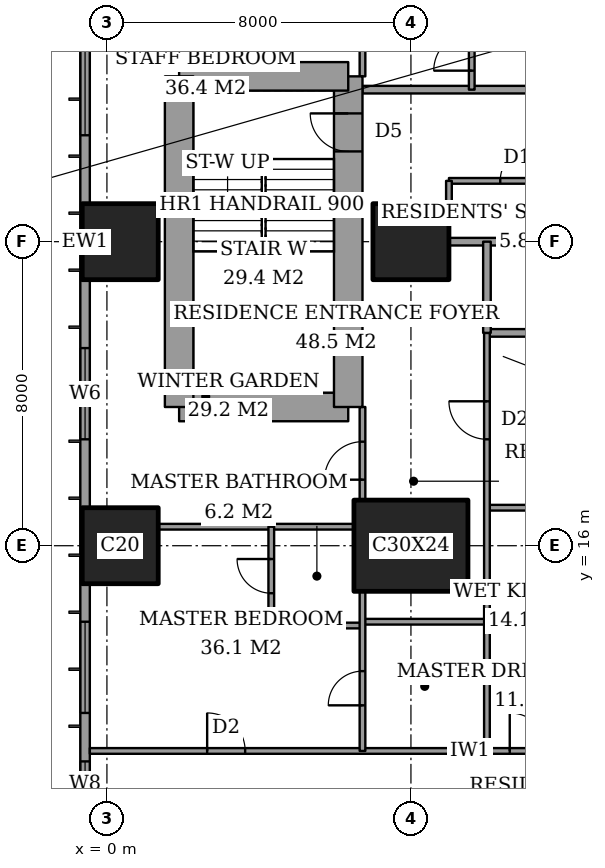
"""IFC4 building model, lengths in metres.
Left out: names, types, materials, properties, quantities, classifications, styles, units other than length and angle.
Written with IfcOpenShell. Run it as: python <this file> out.ifc"""

import sys

from ifc_helpers import new_model, si_unit, direction, frame, frame_2d, origin, origin_2d, place, context, subcontext, project, spatial, rectangle, extrude, element, fill, save


model = new_model("IFC4")
c1 = context("Model", 3, precision=1e-05, world=origin(), true_north=direction((0.0, 1.0)))
c2 = subcontext(c1, "Body", "Model", "MODEL_VIEW")
j1 = project(units=[si_unit("LENGTHUNIT", "METRE"), si_unit("PLANEANGLEUNIT", "RADIAN")], contexts=[c1])
p1 = place(None, origin())
s1 = spatial("IfcSite", under=j1, at=p1, CompositionType="ELEMENT")
p2 = place(p1, origin())
s2 = spatial("IfcBuilding", under=s1, at=p2, CompositionType="ELEMENT")
p3 = place(p2, frame((0.0, 0.0, 51.2)))
s3 = spatial("IfcBuildingStorey", under=s2, at=p3, CompositionType="ELEMENT", Elevation=51.2)
for number, where, z_axis, x_axis in (
    (1, (0.35, 16.0, 0.0), (0.0, 0.0, 1.0), (1.0, 0.0, 0.0)),
    (2, (0.35, 24.0, 0.0), (0.0, 0.0, 1.0), (1.0, 0.0, 0.0)),
):
    element("IfcColumn", number, at=place(p3, frame(where, z_axis=z_axis, x_axis=x_axis)), inside=s3, PredefinedType="COLUMN", context=c2, shape_type="SweptSolid", body=[
        extrude(rectangle(XDim=2.0, YDim=2.0, at=origin_2d()), origin(), (0.0, 0.0, 1.0), 3.6),
    ])
p4 = place(p3, frame((8.0, 16.0, 0.0), z_axis=(0.0, 0.0, 1.0), x_axis=(1.0, 0.0, 0.0)))
e3 = element("IfcColumn", 3, at=p4, inside=s3, PredefinedType="COLUMN", context=c2, shape_type="SweptSolid", body=[
    extrude(rectangle(XDim=3.0, YDim=2.4, at=origin_2d()), origin(), (0.0, 0.0, 1.0), 3.6),
])
p5 = place(p3, frame((8.0, 24.0, 0.0), z_axis=(0.0, 0.0, 1.0), x_axis=(1.0, 0.0, 0.0)))
e4 = element("IfcColumn", 4, at=p5, inside=s3, PredefinedType="COLUMN", context=c2, shape_type="SweptSolid", body=[
    extrude(rectangle(XDim=2.0, YDim=2.0, at=origin_2d()), origin(), (0.0, 0.0, 1.0), 3.6),
])
p6 = place(p3, frame((1.9, 19.65, 0.0), z_axis=(0.0, 0.0, 1.0), x_axis=(1.0, 0.0, 0.0)))
e5 = element("IfcWall", 5, at=p6, inside=s3, PredefinedType="SHEAR", context=c2, shape_type="SweptSolid", body=[
    extrude(rectangle(XDim=4.45, YDim=0.75, at=frame_2d((2.225, 0.0))), origin(), (0.0, 0.0, 1.0), 3.6),
])
p7 = place(p3, frame((6.35, 19.65, 0.0), z_axis=(0.0, 0.0, 1.0), x_axis=(0.0, 1.0, 0.0)))
e6 = element("IfcWall", 6, at=p7, inside=s3, PredefinedType="SHEAR", context=c2, shape_type="SweptSolid", body=[
    extrude(rectangle(XDim=8.7, YDim=0.75, at=frame_2d((4.35, 0.0))), origin(), (0.0, 0.0, 1.0), 3.6),
])
p8 = place(p7, frame((6.725, 0.0, 0.0)))
e7 = element("IfcOpeningElement", 7, at=p8, cuts=e6, PredefinedType="OPENING", context=c2, shape_type="SweptSolid", body=[
    extrude(rectangle(XDim=1.0, YDim=2.1, at=frame_2d((0.5, 1.05))), frame((0.0, 0.385, 0.0), z_axis=(0.0, -1.0, 0.0), x_axis=(1.0, 0.0, 0.0)), (0.0, 0.0, 1.0), 0.77),
])
p9 = place(p3, frame((6.35, 28.35, 0.0), z_axis=(0.0, 0.0, 1.0), x_axis=(-1.0, 0.0, 0.0)))
e8 = element("IfcWall", 8, at=p9, inside=s3, PredefinedType="SHEAR", context=c2, shape_type="SweptSolid", body=[
    extrude(rectangle(XDim=4.45, YDim=0.75, at=frame_2d((2.225, 0.0))), origin(), (0.0, 0.0, 1.0), 3.6),
])
p10 = place(p3, frame((1.9, 28.35, 0.0), z_axis=(0.0, 0.0, 1.0), x_axis=(0.0, -1.0, 0.0)))
e9 = element("IfcWall", 9, at=p10, inside=s3, PredefinedType="SHEAR", context=c2, shape_type="SweptSolid", body=[
    extrude(rectangle(XDim=8.7, YDim=0.75, at=frame_2d((4.35, 0.0))), origin(), (0.0, 0.0, 1.0), 3.6),
])
p11 = place(p3, frame((-0.575, 44.825, 0.0), z_axis=(0.0, 0.0, 1.0), x_axis=(0.0, -1.0, 0.0)))
e10 = element("IfcWall", 10, at=p11, inside=s3, PredefinedType="SOLIDWALL", context=c2, shape_type="SweptSolid", body=[
    extrude(rectangle(XDim=41.65, YDim=0.25, at=frame_2d((20.825, 0.0))), origin(), (0.0, 0.0, 1.0), 3.6),
])
p12 = place(p11, frame((0.775, 0.0, 0.6)))
e11 = element("IfcOpeningElement", 11, at=p12, cuts=e10, PredefinedType="OPENING", context=c2, shape_type="SweptSolid", body=[
    extrude(rectangle(XDim=2.4, YDim=2.0, at=frame_2d((1.2, 1.0))), frame((0.0, 0.135, 0.0), z_axis=(0.0, -1.0, 0.0), x_axis=(1.0, 0.0, 0.0)), (0.0, 0.0, 1.0), 0.27),
])
p13 = place(p11, frame((6.1, 0.0, 0.6)))
e12 = element("IfcOpeningElement", 12, at=p13, cuts=e10, PredefinedType="OPENING", context=c2, shape_type="SweptSolid", body=[
    extrude(rectangle(XDim=1.2, YDim=2.0, at=frame_2d((0.6, 1.0))), frame((0.0, 0.135, 0.0), z_axis=(0.0, -1.0, 0.0), x_axis=(1.0, 0.0, 0.0)), (0.0, 0.0, 1.0), 0.27),
])
p14 = place(p11, frame((8.425, 0.0, 0.6)))
e13 = element("IfcOpeningElement", 13, at=p14, cuts=e10, PredefinedType="OPENING", context=c2, shape_type="SweptSolid", body=[
    extrude(rectangle(XDim=2.4, YDim=2.0, at=frame_2d((1.2, 1.0))), frame((0.0, 0.135, 0.0), z_axis=(0.0, -1.0, 0.0), x_axis=(1.0, 0.0, 0.0)), (0.0, 0.0, 1.0), 0.27),
])
p15 = place(p11, frame((15.625, 0.0, 0.6)))
e14 = element("IfcOpeningElement", 14, at=p15, cuts=e10, PredefinedType="OPENING", context=c2, shape_type="SweptSolid", body=[
    extrude(rectangle(XDim=2.4, YDim=2.0, at=frame_2d((1.2, 1.0))), frame((0.0, 0.135, 0.0), z_axis=(0.0, -1.0, 0.0), x_axis=(1.0, 0.0, 0.0)), (0.0, 0.0, 1.0), 0.27),
])
p16 = place(p11, frame((23.625, 0.0, 0.6)))
e15 = element("IfcOpeningElement", 15, at=p16, cuts=e10, PredefinedType="OPENING", context=c2, shape_type="SweptSolid", body=[
    extrude(rectangle(XDim=2.4, YDim=2.0, at=frame_2d((1.2, 1.0))), frame((0.0, 0.135, 0.0), z_axis=(0.0, -1.0, 0.0), x_axis=(1.0, 0.0, 0.0)), (0.0, 0.0, 1.0), 0.27),
])
p17 = place(p11, frame((30.825, 0.0, 0.6)))
e16 = element("IfcOpeningElement", 16, at=p17, cuts=e10, PredefinedType="OPENING", context=c2, shape_type="SweptSolid", body=[
    extrude(rectangle(XDim=2.4, YDim=2.0, at=frame_2d((1.2, 1.0))), frame((0.0, 0.135, 0.0), z_axis=(0.0, -1.0, 0.0), x_axis=(1.0, 0.0, 0.0)), (0.0, 0.0, 1.0), 0.27),
])
p18 = place(p11, frame((34.5, 0.0, 0.6)))
e17 = element("IfcOpeningElement", 17, at=p18, cuts=e10, PredefinedType="OPENING", context=c2, shape_type="SweptSolid", body=[
    extrude(rectangle(XDim=1.2, YDim=2.0, at=frame_2d((0.6, 1.0))), frame((0.0, 0.135, 0.0), z_axis=(0.0, -1.0, 0.0), x_axis=(1.0, 0.0, 0.0)), (0.0, 0.0, 1.0), 0.27),
])
p19 = place(p11, frame((38.475, 0.0, 0.6)))
e18 = element("IfcOpeningElement", 18, at=p19, cuts=e10, PredefinedType="OPENING", context=c2, shape_type="SweptSolid", body=[
    extrude(rectangle(XDim=2.4, YDim=2.0, at=frame_2d((1.2, 1.0))), frame((0.0, 0.135, 0.0), z_axis=(0.0, -1.0, 0.0), x_axis=(1.0, 0.0, 0.0)), (0.0, 0.0, 1.0), 0.27),
])
p20 = place(p3, frame((-0.45, 10.6, 0.0), z_axis=(0.0, 0.0, 1.0), x_axis=(1.0, 0.0, 0.0)))
e19 = element("IfcWall", 19, at=p20, inside=s3, PredefinedType="PARTITIONING", context=c2, shape_type="SweptSolid", body=[
    extrude(rectangle(XDim=25.011, YDim=0.15, at=frame_2d((12.505, 0.0))), origin(), (0.0, 0.0, 1.0), 3.35),
])
p21 = place(p20, frame((13.25, 0.0, 0.0)))
e20 = element("IfcOpeningElement", 20, at=p21, cuts=e19, PredefinedType="OPENING", context=c2, shape_type="SweptSolid", body=[
    extrude(rectangle(XDim=1.0, YDim=2.1, at=frame_2d((0.5, 1.05))), frame((0.0, 0.085, 0.0), z_axis=(0.0, -1.0, 0.0), x_axis=(1.0, 0.0, 0.0)), (0.0, 0.0, 1.0), 0.17),
])
p22 = place(p20, frame((3.087, 0.0, 0.0)))
e21 = element("IfcOpeningElement", 21, at=p22, cuts=e19, PredefinedType="OPENING", context=c2, shape_type="SweptSolid", body=[
    extrude(rectangle(XDim=1.0, YDim=2.1, at=frame_2d((0.5, 1.05))), frame((0.0, 0.085, 0.0), z_axis=(0.0, -1.0, 0.0), x_axis=(1.0, 0.0, 0.0)), (0.0, 0.0, 1.0), 0.17),
])
p23 = place(p20, frame((11.05, 0.0, 0.0)))
e22 = element("IfcOpeningElement", 22, at=p23, cuts=e19, PredefinedType="OPENING", context=c2, shape_type="SweptSolid", body=[
    extrude(rectangle(XDim=1.0, YDim=2.1, at=frame_2d((0.5, 1.05))), frame((0.0, 0.085, 0.0), z_axis=(0.0, -1.0, 0.0), x_axis=(1.0, 0.0, 0.0)), (0.0, 0.0, 1.0), 0.17),
])
p24 = place(p20, frame((16.15, 0.0, 0.0)))
e23 = element("IfcOpeningElement", 23, at=p24, cuts=e19, PredefinedType="OPENING", context=c2, shape_type="SweptSolid", body=[
    extrude(rectangle(XDim=1.0, YDim=2.1, at=frame_2d((0.5, 1.05))), frame((0.0, 0.085, 0.0), z_axis=(0.0, -1.0, 0.0), x_axis=(1.0, 0.0, 0.0)), (0.0, 0.0, 1.0), 0.17),
])
p25 = place(p20, frame((21.175, 0.0, 0.0)))
e24 = element("IfcOpeningElement", 24, at=p25, cuts=e19, PredefinedType="OPENING", context=c2, shape_type="SweptSolid", body=[
    extrude(rectangle(XDim=1.0, YDim=2.1, at=frame_2d((0.5, 1.05))), frame((0.0, 0.085, 0.0), z_axis=(0.0, -1.0, 0.0), x_axis=(1.0, 0.0, 0.0)), (0.0, 0.0, 1.0), 0.17),
])
p26 = place(p3, frame((4.325, 13.9, 0.0), z_axis=(0.0, 0.0, 1.0), x_axis=(1.0, 0.0, 0.0)))
e25 = element("IfcWall", 25, at=p26, inside=s3, PredefinedType="PARTITIONING", context=c2, shape_type="SweptSolid", body=[
    extrude(rectangle(XDim=2.4, YDim=0.15, at=frame_2d((1.2, 0.0))), origin(), (0.0, 0.0, 1.0), 3.35),
])
p27 = place(p3, frame((6.725, 14.0, 0.0), z_axis=(0.0, 0.0, 1.0), x_axis=(1.0, 0.0, 0.0)))
e26 = element("IfcWall", 26, at=p27, inside=s3, PredefinedType="PARTITIONING", context=c2, shape_type="SweptSolid", body=[
    extrude(rectangle(XDim=3.275, YDim=0.15, at=frame_2d((1.637, 0.0))), origin(), (0.0, 0.0, 1.0), 3.35),
])
p28 = place(p3, frame((1.35, 16.5, 0.0), z_axis=(0.0, 0.0, 1.0), x_axis=(1.0, 0.0, 0.0)))
e27 = element("IfcWall", 27, at=p28, inside=s3, PredefinedType="PARTITIONING", context=c2, shape_type="SweptSolid", body=[
    extrude(rectangle(XDim=5.15, YDim=0.15, at=frame_2d((2.575, 0.0))), origin(), (0.0, 0.0, 1.0), 3.35),
])
p29 = place(p3, frame((10.0, 17.0, 0.0), z_axis=(0.0, 0.0, 1.0), x_axis=(1.0, 0.0, 0.0)))
e28 = element("IfcWall", 28, at=p29, inside=s3, PredefinedType="PARTITIONING", context=c2, shape_type="SweptSolid", body=[
    extrude(rectangle(XDim=4.4, YDim=0.15, at=frame_2d((2.2, 0.0))), origin(), (0.0, 0.0, 1.0), 3.35),
])
p30 = place(p29, frame((2.8, 0.0, 0.0)))
e29 = element("IfcOpeningElement", 29, at=p30, cuts=e28, PredefinedType="OPENING", context=c2, shape_type="SweptSolid", body=[
    extrude(rectangle(XDim=1.0, YDim=2.1, at=frame_2d((0.5, 1.05))), frame((0.0, 0.085, 0.0), z_axis=(0.0, -1.0, 0.0), x_axis=(1.0, 0.0, 0.0)), (0.0, 0.0, 1.0), 0.17),
])
p31 = place(p3, frame((10.0, 21.6, 0.0), z_axis=(0.0, 0.0, 1.0), x_axis=(1.0, 0.0, 0.0)))
e30 = element("IfcWall", 30, at=p31, inside=s3, PredefinedType="PARTITIONING", context=c2, shape_type="SweptSolid", body=[
    extrude(rectangle(XDim=4.8, YDim=0.2, at=frame_2d((2.4, 0.0))), origin(), (0.0, 0.0, 1.0), 3.35),
])
p32 = place(p31, frame((1.95, 0.0, 0.0)))
e31 = element("IfcOpeningElement", 31, at=p32, cuts=e30, PredefinedType="OPENING", context=c2, shape_type="SweptSolid", body=[
    extrude(rectangle(XDim=0.9, YDim=2.1, at=frame_2d((0.45, 1.05))), frame((0.0, 0.11, 0.0), z_axis=(0.0, -1.0, 0.0), x_axis=(1.0, 0.0, 0.0)), (0.0, 0.0, 1.0), 0.22),
])
p33 = place(p3, frame((9.0, 24.0, 0.0), z_axis=(0.0, 0.0, 1.0), x_axis=(1.0, 0.0, 0.0)))
e32 = element("IfcWall", 32, at=p33, inside=s3, PredefinedType="PARTITIONING", context=c2, shape_type="SweptSolid", body=[
    extrude(rectangle(XDim=6.0, YDim=0.2, at=frame_2d((3.0, 0.0))), origin(), (0.0, 0.0, 1.0), 3.35),
])
p34 = place(p3, frame((9.0, 25.6, 0.0), z_axis=(0.0, 0.0, 1.0), x_axis=(1.0, 0.0, 0.0)))
e33 = element("IfcWall", 33, at=p34, inside=s3, PredefinedType="PARTITIONING", context=c2, shape_type="SweptSolid", body=[
    extrude(rectangle(XDim=3.6, YDim=0.15, at=frame_2d((1.8, 0.0))), origin(), (0.0, 0.0, 1.0), 3.35),
])
p35 = place(p34, frame((1.35, 0.0, 0.0)))
e34 = element("IfcOpeningElement", 34, at=p35, cuts=e33, PredefinedType="OPENING", context=c2, shape_type="SweptSolid", body=[
    extrude(rectangle(XDim=0.9, YDim=2.1, at=frame_2d((0.45, 1.05))), frame((0.0, 0.085, 0.0), z_axis=(0.0, -1.0, 0.0), x_axis=(1.0, 0.0, 0.0)), (0.0, 0.0, 1.0), 0.17),
])
p36 = place(p3, frame((6.725, 28.0, 0.0), z_axis=(0.0, 0.0, 1.0), x_axis=(1.0, 0.0, 0.0)))
e35 = element("IfcWall", 35, at=p36, inside=s3, PredefinedType="PARTITIONING", context=c2, shape_type="SweptSolid", body=[
    extrude(rectangle(XDim=17.275, YDim=0.2, at=frame_2d((8.637, 0.0))), origin(), (0.0, 0.0, 1.0), 3.35),
])
p37 = place(p36, frame((6.475, 0.0, 0.0)))
e36 = element("IfcOpeningElement", 36, at=p37, cuts=e35, PredefinedType="OPENING", context=c2, shape_type="SweptSolid", body=[
    extrude(rectangle(XDim=1.2, YDim=2.4, at=frame_2d((0.6, 1.2))), frame((0.0, 0.11, 0.0), z_axis=(0.0, -1.0, 0.0), x_axis=(1.0, 0.0, 0.0)), (0.0, 0.0, 1.0), 0.22),
])
p38 = place(p3, frame((4.325, 13.9, 0.0), z_axis=(0.0, 0.0, 1.0), x_axis=(0.0, 1.0, 0.0)))
e37 = element("IfcWall", 37, at=p38, inside=s3, PredefinedType="PARTITIONING", context=c2, shape_type="SweptSolid", body=[
    extrude(rectangle(XDim=2.6, YDim=0.15, at=frame_2d((1.3, 0.0))), origin(), (0.0, 0.0, 1.0), 3.35),
])
p39 = place(p38, frame((0.85, 0.0, 0.0)))
e38 = element("IfcOpeningElement", 38, at=p39, cuts=e37, PredefinedType="OPENING", context=c2, shape_type="SweptSolid", body=[
    extrude(rectangle(XDim=0.9, YDim=2.1, at=frame_2d((0.45, 1.05))), frame((0.0, 0.085, 0.0), z_axis=(0.0, -1.0, 0.0), x_axis=(1.0, 0.0, 0.0)), (0.0, 0.0, 1.0), 0.17),
])
p40 = place(p3, frame((6.725, 10.6, 0.0), z_axis=(0.0, 0.0, 1.0), x_axis=(0.0, 1.0, 0.0)))
e39 = element("IfcWall", 39, at=p40, inside=s3, PredefinedType="PARTITIONING", context=c2, shape_type="SweptSolid", body=[
    extrude(rectangle(XDim=4.2, YDim=0.15, at=frame_2d((2.1, 0.0))), origin(), (0.0, 0.0, 1.0), 3.35),
])
p41 = place(p40, frame((1.2, 0.0, 0.0)))
e40 = element("IfcOpeningElement", 40, at=p41, cuts=e39, PredefinedType="OPENING", context=c2, shape_type="SweptSolid", body=[
    extrude(rectangle(XDim=0.9, YDim=2.1, at=frame_2d((0.45, 1.05))), frame((0.0, 0.085, 0.0), z_axis=(0.0, -1.0, 0.0), x_axis=(1.0, 0.0, 0.0)), (0.0, 0.0, 1.0), 0.17),
])
p42 = place(p3, frame((6.725, 17.2, 0.0), z_axis=(0.0, 0.0, 1.0), x_axis=(0.0, 1.0, 0.0)))
e41 = element("IfcWall", 41, at=p42, inside=s3, PredefinedType="PARTITIONING", context=c2, shape_type="SweptSolid", body=[
    extrude(rectangle(XDim=2.45, YDim=0.15, at=frame_2d((1.225, 0.0))), origin(), (0.0, 0.0, 1.0), 3.35),
])
p43 = place(p42, frame((0.538, 0.0, 0.0)))
e42 = element("IfcOpeningElement", 42, at=p43, cuts=e41, PredefinedType="OPENING", context=c2, shape_type="SweptSolid", body=[
    extrude(rectangle(XDim=1.0, YDim=2.1, at=frame_2d((0.5, 1.05))), frame((0.0, 0.085, 0.0), z_axis=(0.0, -1.0, 0.0), x_axis=(1.0, 0.0, 0.0)), (0.0, 0.0, 1.0), 0.17),
])
p44 = place(p3, frame((6.725, 28.35, 0.0), z_axis=(0.0, 0.0, 1.0), x_axis=(0.0, 1.0, 0.0)))
e43 = element("IfcWall", 43, at=p44, inside=s3, PredefinedType="PARTITIONING", context=c2, shape_type="SweptSolid", body=[
    extrude(rectangle(XDim=2.45, YDim=0.15, at=frame_2d((1.225, 0.0))), origin(), (0.0, 0.0, 1.0), 3.35),
])
p45 = place(p44, frame((0.913, 0.0, 0.0)))
e44 = element("IfcOpeningElement", 44, at=p45, cuts=e43, PredefinedType="OPENING", context=c2, shape_type="SweptSolid", body=[
    extrude(rectangle(XDim=1.0, YDim=2.1, at=frame_2d((0.5, 1.05))), frame((0.0, 0.085, 0.0), z_axis=(0.0, -1.0, 0.0), x_axis=(1.0, 0.0, 0.0)), (0.0, 0.0, 1.0), 0.17),
])
p46 = place(p3, frame((9.0, 25.0, 0.0), z_axis=(0.0, 0.0, 1.0), x_axis=(0.0, 1.0, 0.0)))
e45 = element("IfcWall", 45, at=p46, inside=s3, PredefinedType="PARTITIONING", context=c2, shape_type="SweptSolid", body=[
    extrude(rectangle(XDim=0.6, YDim=0.15, at=frame_2d((0.3, 0.0))), origin(), (0.0, 0.0, 1.0), 3.35),
])
p47 = place(p3, frame((9.6, 28.0, 0.0), z_axis=(0.0, 0.0, 1.0), x_axis=(0.0, 1.0, 0.0)))
e46 = element("IfcWall", 46, at=p47, inside=s3, PredefinedType="PARTITIONING", context=c2, shape_type="SweptSolid", body=[
    extrude(rectangle(XDim=9.4, YDim=0.15, at=frame_2d((4.7, 0.0))), origin(), (0.0, 0.0, 1.0), 3.35),
])
p48 = place(p47, frame((0.5, 0.0, 0.0)))
e47 = element("IfcOpeningElement", 47, at=p48, cuts=e46, PredefinedType="OPENING", context=c2, shape_type="SweptSolid", body=[
    extrude(rectangle(XDim=1.0, YDim=2.1, at=frame_2d((0.5, 1.05))), frame((0.0, 0.085, 0.0), z_axis=(0.0, -1.0, 0.0), x_axis=(1.0, 0.0, 0.0)), (0.0, 0.0, 1.0), 0.17),
])
p49 = place(p3, frame((10.0, 21.6, 0.0), z_axis=(0.0, 0.0, 1.0), x_axis=(0.0, 1.0, 0.0)))
e48 = element("IfcWall", 48, at=p49, inside=s3, PredefinedType="PARTITIONING", context=c2, shape_type="SweptSolid", body=[
    extrude(rectangle(XDim=2.4, YDim=0.2, at=frame_2d((1.2, 0.0))), origin(), (0.0, 0.0, 1.0), 3.35),
])
p50 = place(p3, frame((10.0, 10.6, 0.0), z_axis=(0.0, 0.0, 1.0), x_axis=(0.0, 1.0, 0.0)))
e49 = element("IfcWall", 49, at=p50, inside=s3, PredefinedType="PARTITIONING", context=c2, shape_type="SweptSolid", body=[
    extrude(rectangle(XDim=11.0, YDim=0.15, at=frame_2d((5.5, 0.0))), origin(), (0.0, 0.0, 1.0), 3.35),
])
p51 = place(p50, frame((8.2, 0.0, 0.0)))
e50 = element("IfcOpeningElement", 50, at=p51, cuts=e49, PredefinedType="OPENING", context=c2, shape_type="SweptSolid", body=[
    extrude(rectangle(XDim=1.0, YDim=2.1, at=frame_2d((0.5, 1.05))), frame((0.0, 0.085, 0.0), z_axis=(0.0, -1.0, 0.0), x_axis=(1.0, 0.0, 0.0)), (0.0, 0.0, 1.0), 0.17),
])
p52 = place(p15, origin())
e51 = element("IfcWindow", 51, at=p52, inside=s3, PartitioningType="SINGLE_PANEL", PredefinedType="WINDOW", context=c2, shape_type="SweptSolid", body=[
    extrude(rectangle(XDim=2.4, YDim=2.0, at=frame_2d((1.2, 1.0))), frame((0.0, 0.03, 0.0), z_axis=(0.0, -1.0, 0.0), x_axis=(1.0, 0.0, 0.0)), (0.0, 0.0, 1.0), 0.06),
])
fill(e14, e51)
p53 = place(p16, origin())
e52 = element("IfcWindow", 52, at=p53, inside=s3, PartitioningType="SINGLE_PANEL", PredefinedType="WINDOW", context=c2, shape_type="SweptSolid", body=[
    extrude(rectangle(XDim=2.4, YDim=2.0, at=frame_2d((1.2, 1.0))), frame((0.0, 0.03, 0.0), z_axis=(0.0, -1.0, 0.0), x_axis=(1.0, 0.0, 0.0)), (0.0, 0.0, 1.0), 0.06),
])
fill(e15, e52)
p54 = place(p17, origin())
e53 = element("IfcWindow", 53, at=p54, inside=s3, PartitioningType="SINGLE_PANEL", PredefinedType="WINDOW", context=c2, shape_type="SweptSolid", body=[
    extrude(rectangle(XDim=2.4, YDim=2.0, at=frame_2d((1.2, 1.0))), frame((0.0, 0.03, 0.0), z_axis=(0.0, -1.0, 0.0), x_axis=(1.0, 0.0, 0.0)), (0.0, 0.0, 1.0), 0.06),
])
fill(e16, e53)
p55 = place(p18, origin())
e54 = element("IfcWindow", 54, at=p55, inside=s3, PartitioningType="SINGLE_PANEL", PredefinedType="WINDOW", context=c2, shape_type="SweptSolid", body=[
    extrude(rectangle(XDim=1.2, YDim=2.0, at=frame_2d((0.6, 1.0))), frame((0.0, 0.03, 0.0), z_axis=(0.0, -1.0, 0.0), x_axis=(1.0, 0.0, 0.0)), (0.0, 0.0, 1.0), 0.06),
])
fill(e17, e54)
p56 = place(p39, origin())
e55 = element("IfcDoor", 55, at=p56, inside=s3, OperationType="SINGLE_SWING_LEFT", PredefinedType="DOOR", context=c2, shape_type="SweptSolid", body=[
    extrude(rectangle(XDim=0.9, YDim=2.1, at=frame_2d((0.45, 1.05))), frame((0.0, 0.025, 0.0), z_axis=(0.0, -1.0, 0.0), x_axis=(1.0, 0.0, 0.0)), (0.0, 0.0, 1.0), 0.05),
])
fill(e38, e55)
p57 = place(p22, origin())
e56 = element("IfcDoor", 56, at=p57, inside=s3, OperationType="SINGLE_SWING_RIGHT", PredefinedType="DOOR", context=c2, shape_type="SweptSolid", body=[
    extrude(rectangle(XDim=1.0, YDim=2.1, at=frame_2d((0.5, 1.05))), frame((0.0, 0.025, 0.0), z_axis=(0.0, -1.0, 0.0), x_axis=(1.0, 0.0, 0.0)), (0.0, 0.0, 1.0), 0.05),
])
fill(e21, e56)
p58 = place(p43, origin())
e57 = element("IfcDoor", 57, at=p58, inside=s3, OperationType="SINGLE_SWING_RIGHT", PredefinedType="DOOR", context=c2, shape_type="SweptSolid", body=[
    extrude(rectangle(XDim=1.0, YDim=2.1, at=frame_2d((0.5, 1.05))), frame((0.0, 0.025, 0.0), z_axis=(0.0, -1.0, 0.0), x_axis=(1.0, 0.0, 0.0)), (0.0, 0.0, 1.0), 0.05),
])
fill(e42, e57)
p59 = place(p41, origin())
e58 = element("IfcDoor", 58, at=p59, inside=s3, OperationType="SINGLE_SWING_RIGHT", PredefinedType="DOOR", context=c2, shape_type="SweptSolid", body=[
    extrude(rectangle(XDim=0.9, YDim=2.1, at=frame_2d((0.45, 1.05))), frame((0.0, 0.025, 0.0), z_axis=(0.0, -1.0, 0.0), x_axis=(1.0, 0.0, 0.0)), (0.0, 0.0, 1.0), 0.05),
])
fill(e40, e58)
p60 = place(p51, origin())
e59 = element("IfcDoor", 59, at=p60, inside=s3, OperationType="SINGLE_SWING_LEFT", PredefinedType="DOOR", context=c2, shape_type="SweptSolid", body=[
    extrude(rectangle(XDim=1.0, YDim=2.1, at=frame_2d((0.5, 1.05))), frame((0.0, 0.025, 0.0), z_axis=(0.0, -1.0, 0.0), x_axis=(1.0, 0.0, 0.0)), (0.0, 0.0, 1.0), 0.05),
])
fill(e50, e59)
p61 = place(p23, origin())
e60 = element("IfcDoor", 60, at=p61, inside=s3, OperationType="SINGLE_SWING_RIGHT", PredefinedType="DOOR", context=c2, shape_type="SweptSolid", body=[
    extrude(rectangle(XDim=1.0, YDim=2.1, at=frame_2d((0.5, 1.05))), frame((0.0, 0.025, 0.0), z_axis=(0.0, -1.0, 0.0), x_axis=(1.0, 0.0, 0.0)), (0.0, 0.0, 1.0), 0.05),
])
fill(e22, e60)
p62 = place(p48, origin())
e61 = element("IfcDoor", 61, at=p62, inside=s3, OperationType="SINGLE_SWING_RIGHT", PredefinedType="DOOR", context=c2, shape_type="SweptSolid", body=[
    extrude(rectangle(XDim=1.0, YDim=2.1, at=frame_2d((0.5, 1.05))), frame((0.0, 0.025, 0.0), z_axis=(0.0, -1.0, 0.0), x_axis=(1.0, 0.0, 0.0)), (0.0, 0.0, 1.0), 0.05),
])
fill(e47, e61)
p63 = place(p35, origin())
e62 = element("IfcDoor", 62, at=p63, inside=s3, OperationType="SINGLE_SWING_LEFT", PredefinedType="DOOR", context=c2, shape_type="SweptSolid", body=[
    extrude(rectangle(XDim=0.9, YDim=2.1, at=frame_2d((0.45, 1.05))), frame((0.0, 0.025, 0.0), z_axis=(0.0, -1.0, 0.0), x_axis=(1.0, 0.0, 0.0)), (0.0, 0.0, 1.0), 0.05),
])
fill(e34, e62)
p64 = place(p8, origin())
e63 = element("IfcDoor", 63, at=p64, inside=s3, OperationType="SINGLE_SWING_LEFT", PredefinedType="DOOR", context=c2, shape_type="SweptSolid", body=[
    extrude(rectangle(XDim=1.0, YDim=2.1, at=frame_2d((0.5, 1.05))), frame((0.0, 0.025, 0.0), z_axis=(0.0, -1.0, 0.0), x_axis=(1.0, 0.0, 0.0)), (0.0, 0.0, 1.0), 0.05),
])
fill(e7, e63)
save(model, sys.argv[1])
